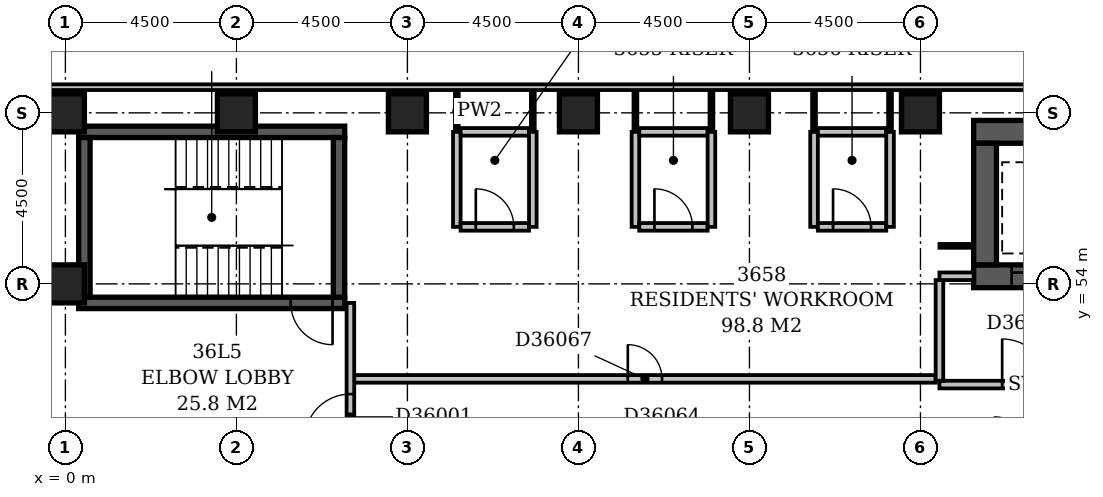
"""IFC4 building model, lengths in metres.
Left out: names, types, materials, properties, quantities, classifications, styles, units other than length and angle.
Written with IfcOpenShell. Run it as: python <this file> out.ifc"""

import sys

from ifc_helpers import new_model, si_unit, direction, frame, frame_2d, origin, origin_2d, place, context, subcontext, project, spatial, rectangle, extrude, element, fill, save


model = new_model("IFC4")
c1 = context("Model", 3, precision=1e-05, world=origin(), true_north=direction((0.0, 1.0)))
c2 = subcontext(c1, "Body", "Model", "MODEL_VIEW")
j1 = project(units=[si_unit("LENGTHUNIT", "METRE"), si_unit("PLANEANGLEUNIT", "RADIAN")], contexts=[c1])
p1 = place(None, origin())
s1 = spatial("IfcSite", under=j1, at=p1, CompositionType="ELEMENT")
p2 = place(p1, origin())
s2 = spatial("IfcBuilding", under=s1, at=p2, CompositionType="ELEMENT")
p3 = place(p2, frame((0.0, 0.0, 144.8)))
s3 = spatial("IfcBuildingStorey", under=s2, at=p3, CompositionType="ELEMENT", Elevation=144.8)
p4 = place(p3, frame((0.35, 53.5, -0.3), z_axis=(0.0, 0.0, 1.0), x_axis=(1.0, 0.0, 0.0)))
e1 = element("IfcWall", 1, at=p4, inside=s3, PredefinedType="SHEAR", context=c2, shape_type="SweptSolid", body=[
    extrude(rectangle(XDim=7.0, YDim=0.3, at=frame_2d((3.5, 0.0))), origin(), (0.0, 0.0, 1.0), 3.6),
])
p5 = place(p4, frame((5.58, 0.0, 0.3)))
e2 = element("IfcOpeningElement", 2, at=p5, cuts=e1, PredefinedType="OPENING", context=c2, shape_type="SweptSolid", body=[
    extrude(rectangle(XDim=1.1, YDim=2.1, at=frame_2d((0.55, 1.05))), frame((0.0, 0.162, 0.0), z_axis=(0.0, -1.0, 0.0), x_axis=(1.0, 0.0, 0.0)), (0.0, 0.0, 1.0), 0.324),
])
p6 = place(p3, frame((0.35, 58.0, -0.3), z_axis=(0.0, 0.0, 1.0), x_axis=(1.0, 0.0, 0.0)))
e3 = element("IfcWall", 3, at=p6, inside=s3, PredefinedType="SHEAR", context=c2, shape_type="SweptSolid", body=[
    extrude(rectangle(XDim=7.0, YDim=0.3, at=frame_2d((3.5, 0.0))), origin(), (0.0, 0.0, 1.0), 3.6),
])
for number, where, z_axis, x_axis in (
    (4, (0.5, 53.65, -0.3), (0.0, 0.0, 1.0), (0.0, 1.0, 0.0)),
    (5, (7.2, 53.65, -0.3), (0.0, 0.0, 1.0), (0.0, 1.0, 0.0)),
):
    element("IfcWall", number, at=place(p3, frame(where, z_axis=z_axis, x_axis=x_axis)), inside=s3, PredefinedType="SHEAR", context=c2, shape_type="SweptSolid", body=[
        extrude(rectangle(XDim=4.2, YDim=0.3, at=frame_2d((2.1, 0.0))), origin(), (0.0, 0.0, 1.0), 3.6),
    ])
p7 = place(p3, frame((23.9, 54.2, -0.3), z_axis=(0.0, 0.0, 1.0), x_axis=(1.0, 0.0, 0.0)))
e6 = element("IfcWall", 6, at=p7, inside=s3, PredefinedType="SHEAR", context=c2, shape_type="SweptSolid", body=[
    extrude(rectangle(XDim=3.1, YDim=0.6, at=frame_2d((1.55, 0.0))), origin(), (0.0, 0.0, 1.0), 3.6),
])
p8 = place(p7, frame((1.0, 0.0, 0.3)))
e7 = element("IfcOpeningElement", 7, at=p8, cuts=e6, PredefinedType="OPENING", context=c2, shape_type="SweptSolid", body=[
    extrude(rectangle(XDim=1.1, YDim=2.1, at=frame_2d((0.55, 1.05))), frame((0.0, 0.312, 0.0), z_axis=(0.0, -1.0, 0.0), x_axis=(1.0, 0.0, 0.0)), (0.0, 0.0, 1.0), 0.624),
])
p9 = place(p3, frame((23.9, 58.0, -0.3), z_axis=(0.0, 0.0, 1.0), x_axis=(1.0, 0.0, 0.0)))
e8 = element("IfcWall", 8, at=p9, inside=s3, PredefinedType="SHEAR", context=c2, shape_type="SweptSolid", body=[
    extrude(rectangle(XDim=3.1, YDim=0.6, at=frame_2d((1.55, 0.0))), origin(), (0.0, 0.0, 1.0), 3.6),
])
p10 = place(p3, frame((24.2, 54.5, -0.3), z_axis=(0.0, 0.0, 1.0), x_axis=(0.0, 1.0, 0.0)))
e9 = element("IfcWall", 9, at=p10, inside=s3, PredefinedType="SHEAR", context=c2, shape_type="SweptSolid", body=[
    extrude(rectangle(XDim=3.2, YDim=0.6, at=frame_2d((1.6, 0.0))), origin(), (0.0, 0.0, 1.0), 3.6),
])
for number, where, z_axis, x_axis in (
    (10, (0.0, 54.0, -0.3), (0.0, 0.0, 1.0), (1.0, 0.0, 0.0)),
    (11, (0.0, 58.5, -0.3), (0.0, 0.0, 1.0), (1.0, 0.0, 0.0)),
    (12, (4.5, 58.5, -0.3), (0.0, 0.0, 1.0), (1.0, 0.0, 0.0)),
    (13, (9.0, 58.5, -0.3), (0.0, 0.0, 1.0), (1.0, 0.0, 0.0)),
    (14, (13.5, 58.5, -0.3), (0.0, 0.0, 1.0), (1.0, 0.0, 0.0)),
    (15, (18.0, 58.5, -0.3), (0.0, 0.0, 1.0), (1.0, 0.0, 0.0)),
    (16, (22.5, 58.5, -0.3), (0.0, 0.0, 1.0), (1.0, 0.0, 0.0)),
):
    element("IfcColumn", number, at=place(p3, frame(where, z_axis=z_axis, x_axis=x_axis)), inside=s3, PredefinedType="COLUMN", context=c2, shape_type="SweptSolid", body=[
        extrude(rectangle(XDim=1.0, YDim=1.0, at=origin_2d()), origin(), (0.0, 0.0, 1.0), 3.6),
    ])
p11 = place(p3, frame((68.1, 59.175, 0.0), z_axis=(0.0, 0.0, 1.0), x_axis=(-1.0, 0.0, 0.0)))
e17 = element("IfcWall", 17, at=p11, inside=s3, PredefinedType="STANDARD", context=c2, shape_type="SweptSolid", body=[
    extrude(rectangle(XDim=68.85, YDim=0.15, at=frame_2d((34.425, 0.0))), origin(), (0.0, 0.0, 1.0), 2.7),
])
p12 = place(p11, frame((15.15, 0.0, 0.6)))
e18 = element("IfcOpeningElement", 18, at=p12, cuts=e17, PredefinedType="OPENING", context=c2, shape_type="SweptSolid", body=[
    extrude(rectangle(XDim=2.4, YDim=1.8, at=frame_2d((1.2, 0.9))), frame((0.0, 0.087, 0.0), z_axis=(0.0, -1.0, 0.0), x_axis=(1.0, 0.0, 0.0)), (0.0, 0.0, 1.0), 0.174),
])
p13 = place(p11, frame((19.65, 0.0, 0.6)))
e19 = element("IfcOpeningElement", 19, at=p13, cuts=e17, PredefinedType="OPENING", context=c2, shape_type="SweptSolid", body=[
    extrude(rectangle(XDim=2.4, YDim=1.8, at=frame_2d((1.2, 0.9))), frame((0.0, 0.087, 0.0), z_axis=(0.0, -1.0, 0.0), x_axis=(1.0, 0.0, 0.0)), (0.0, 0.0, 1.0), 0.174),
])
p14 = place(p11, frame((37.65, 0.0, 0.6)))
e20 = element("IfcOpeningElement", 20, at=p14, cuts=e17, PredefinedType="OPENING", context=c2, shape_type="SweptSolid", body=[
    extrude(rectangle(XDim=2.4, YDim=1.8, at=frame_2d((1.2, 0.9))), frame((0.0, 0.087, 0.0), z_axis=(0.0, -1.0, 0.0), x_axis=(1.0, 0.0, 0.0)), (0.0, 0.0, 1.0), 0.174),
])
p15 = place(p3, frame((23.0, 51.35, 0.0), z_axis=(0.0, 0.0, 1.0), x_axis=(1.0, 0.0, 0.0)))
e21 = element("IfcWall", 21, at=p15, inside=s3, PredefinedType="PARTITIONING", context=c2, shape_type="SweptSolid", body=[
    extrude(rectangle(XDim=4.8, YDim=0.2, at=frame_2d((2.4, 0.0))), origin(), (0.0, 0.0, 1.0), 3.3),
])
p16 = place(p15, frame((1.65, 0.0, 0.0)))
e22 = element("IfcOpeningElement", 22, at=p16, cuts=e21, PredefinedType="OPENING", context=c2, shape_type="SweptSolid", body=[
    extrude(rectangle(XDim=1.2, YDim=2.1, at=frame_2d((0.6, 1.05))), frame((0.0, 0.112, 0.0), z_axis=(0.0, -1.0, 0.0), x_axis=(1.0, 0.0, 0.0)), (0.0, 0.0, 1.0), 0.224),
])
p17 = place(p3, frame((23.0, 54.2, 0.0), z_axis=(0.0, 0.0, 1.0), x_axis=(1.0, 0.0, 0.0)))
e23 = element("IfcWall", 23, at=p17, inside=s3, PredefinedType="PARTITIONING", context=c2, shape_type="SweptSolid", body=[
    extrude(rectangle(XDim=0.9, YDim=0.2, at=frame_2d((0.45, 0.0))), origin(), (0.0, 0.0, 1.0), 3.3),
])
p18 = place(p3, frame((23.0, 51.45, 0.0), z_axis=(0.0, 0.0, 1.0), x_axis=(0.0, 1.0, 0.0)))
e24 = element("IfcWall", 24, at=p18, inside=s3, PredefinedType="PARTITIONING", context=c2, shape_type="SweptSolid", body=[
    extrude(rectangle(XDim=2.65, YDim=0.2, at=frame_2d((1.325, 0.0))), origin(), (0.0, 0.0, 1.0), 3.3),
])
p19 = place(p3, frame((7.5, 49.6, 0.0), z_axis=(0.0, 0.0, 1.0), x_axis=(0.0, 1.0, 0.0)))
e25 = element("IfcWall", 25, at=p19, inside=s3, PredefinedType="PARTITIONING", context=c2, shape_type="SweptSolid", body=[
    extrude(rectangle(XDim=3.9, YDim=0.2, at=frame_2d((1.95, 0.0))), origin(), (0.0, 0.0, 1.0), 3.3),
])
p20 = place(p19, frame((0.3, 0.0, 0.0)))
e26 = element("IfcOpeningElement", 26, at=p20, cuts=e25, PredefinedType="OPENING", context=c2, shape_type="SweptSolid", body=[
    extrude(rectangle(XDim=1.2, YDim=2.1, at=frame_2d((0.6, 1.05))), frame((0.0, 0.112, 0.0), z_axis=(0.0, -1.0, 0.0), x_axis=(1.0, 0.0, 0.0)), (0.0, 0.0, 1.0), 0.224),
])
p21 = place(p3, frame((7.6, 51.5, 0.0), z_axis=(0.0, 0.0, 1.0), x_axis=(1.0, 0.0, 0.0)))
e27 = element("IfcWall", 27, at=p21, inside=s3, PredefinedType="PARTITIONING", context=c2, shape_type="SweptSolid", body=[
    extrude(rectangle(XDim=15.3, YDim=0.2, at=frame_2d((7.65, 0.0))), origin(), (0.0, 0.0, 1.0), 3.3),
])
p22 = place(p21, frame((7.2, 0.0, 0.0)))
e28 = element("IfcOpeningElement", 28, at=p22, cuts=e27, PredefinedType="OPENING", context=c2, shape_type="SweptSolid", body=[
    extrude(rectangle(XDim=0.9, YDim=2.1, at=frame_2d((0.45, 1.05))), frame((0.0, 0.112, 0.0), z_axis=(0.0, -1.0, 0.0), x_axis=(1.0, 0.0, 0.0)), (0.0, 0.0, 1.0), 0.224),
])
p23 = place(p3, frame((23.0, 55.0, 0.0), z_axis=(0.0, 0.0, 1.0), x_axis=(1.0, 0.0, 0.0)))
e29 = element("IfcWall", 29, at=p23, inside=s3, PredefinedType="PARTITIONING", context=c2, shape_type="SweptSolid", body=[
    extrude(rectangle(XDim=0.9, YDim=0.1, at=frame_2d((0.45, 0.0))), origin(), (0.0, 0.0, 1.0), 3.3),
])
p24 = place(p3, frame((10.3, 55.5, 0.0), z_axis=(0.0, 0.0, 1.0), x_axis=(0.0, 1.0, 0.0)))
e30 = element("IfcWall", 30, at=p24, inside=s3, PredefinedType="PARTITIONING", context=c2, shape_type="SweptSolid", body=[
    extrude(rectangle(XDim=2.5, YDim=0.2, at=frame_2d((1.25, 0.0))), origin(), (0.0, 0.0, 1.0), 3.3),
])
p25 = place(p3, frame((10.4, 55.5, 0.0), z_axis=(0.0, 0.0, 1.0), x_axis=(1.0, 0.0, 0.0)))
e31 = element("IfcWall", 31, at=p25, inside=s3, PredefinedType="PARTITIONING", context=c2, shape_type="SweptSolid", body=[
    extrude(rectangle(XDim=1.8, YDim=0.2, at=frame_2d((0.9, 0.0))), origin(), (0.0, 0.0, 1.0), 3.3),
])
p26 = place(p25, frame((0.4, 0.0, 0.0)))
e32 = element("IfcOpeningElement", 32, at=p26, cuts=e31, PredefinedType="OPENING", context=c2, shape_type="SweptSolid", body=[
    extrude(rectangle(XDim=1.0, YDim=2.1, at=frame_2d((0.5, 1.05))), frame((0.0, 0.112, 0.0), z_axis=(0.0, -1.0, 0.0), x_axis=(1.0, 0.0, 0.0)), (0.0, 0.0, 1.0), 0.224),
])
for number, where, z_axis, x_axis in (
    (33, (12.3, 55.5, 0.0), (0.0, 0.0, 1.0), (0.0, 1.0, 0.0)),
    (34, (15.0, 55.5, 0.0), (0.0, 0.0, 1.0), (0.0, 1.0, 0.0)),
):
    element("IfcWall", number, at=place(p3, frame(where, z_axis=z_axis, x_axis=x_axis)), inside=s3, PredefinedType="PARTITIONING", context=c2, shape_type="SweptSolid", body=[
        extrude(rectangle(XDim=2.5, YDim=0.2, at=frame_2d((1.25, 0.0))), origin(), (0.0, 0.0, 1.0), 3.3),
    ])
p27 = place(p3, frame((15.1, 55.5, 0.0), z_axis=(0.0, 0.0, 1.0), x_axis=(1.0, 0.0, 0.0)))
e35 = element("IfcWall", 35, at=p27, inside=s3, PredefinedType="PARTITIONING", context=c2, shape_type="SweptSolid", body=[
    extrude(rectangle(XDim=1.8, YDim=0.2, at=frame_2d((0.9, 0.0))), origin(), (0.0, 0.0, 1.0), 3.3),
])
p28 = place(p27, frame((0.4, 0.0, 0.0)))
e36 = element("IfcOpeningElement", 36, at=p28, cuts=e35, PredefinedType="OPENING", context=c2, shape_type="SweptSolid", body=[
    extrude(rectangle(XDim=1.0, YDim=2.1, at=frame_2d((0.5, 1.05))), frame((0.0, 0.112, 0.0), z_axis=(0.0, -1.0, 0.0), x_axis=(1.0, 0.0, 0.0)), (0.0, 0.0, 1.0), 0.224),
])
for number, where, z_axis, x_axis in (
    (37, (17.0, 55.5, 0.0), (0.0, 0.0, 1.0), (0.0, 1.0, 0.0)),
    (38, (19.7, 55.5, 0.0), (0.0, 0.0, 1.0), (0.0, 1.0, 0.0)),
):
    element("IfcWall", number, at=place(p3, frame(where, z_axis=z_axis, x_axis=x_axis)), inside=s3, PredefinedType="PARTITIONING", context=c2, shape_type="SweptSolid", body=[
        extrude(rectangle(XDim=2.5, YDim=0.2, at=frame_2d((1.25, 0.0))), origin(), (0.0, 0.0, 1.0), 3.3),
    ])
p29 = place(p3, frame((19.8, 55.5, 0.0), z_axis=(0.0, 0.0, 1.0), x_axis=(1.0, 0.0, 0.0)))
e39 = element("IfcWall", 39, at=p29, inside=s3, PredefinedType="PARTITIONING", context=c2, shape_type="SweptSolid", body=[
    extrude(rectangle(XDim=1.8, YDim=0.2, at=frame_2d((0.9, 0.0))), origin(), (0.0, 0.0, 1.0), 3.3),
])
p30 = place(p29, frame((0.4, 0.0, 0.0)))
e40 = element("IfcOpeningElement", 40, at=p30, cuts=e39, PredefinedType="OPENING", context=c2, shape_type="SweptSolid", body=[
    extrude(rectangle(XDim=1.0, YDim=2.1, at=frame_2d((0.5, 1.05))), frame((0.0, 0.112, 0.0), z_axis=(0.0, -1.0, 0.0), x_axis=(1.0, 0.0, 0.0)), (0.0, 0.0, 1.0), 0.224),
])
p31 = place(p3, frame((21.7, 55.5, 0.0), z_axis=(0.0, 0.0, 1.0), x_axis=(0.0, 1.0, 0.0)))
e41 = element("IfcWall", 41, at=p31, inside=s3, PredefinedType="PARTITIONING", context=c2, shape_type="SweptSolid", body=[
    extrude(rectangle(XDim=2.5, YDim=0.2, at=frame_2d((1.25, 0.0))), origin(), (0.0, 0.0, 1.0), 3.3),
])
p32 = place(p3, frame((10.3, 58.0, 0.0), z_axis=(0.0, 0.0, 1.0), x_axis=(0.0, 1.0, 0.0)))
e42 = element("IfcWall", 42, at=p32, inside=s3, PredefinedType="PARTITIONING", context=c2, shape_type="SweptSolid", body=[
    extrude(rectangle(XDim=1.1, YDim=0.1, at=frame_2d((0.55, 0.0))), origin(), (0.0, 0.0, 1.0), 3.3),
])
p33 = place(p3, frame((10.4, 58.0, 0.0), z_axis=(0.0, 0.0, 1.0), x_axis=(1.0, 0.0, 0.0)))
e43 = element("IfcWall", 43, at=p33, inside=s3, PredefinedType="PARTITIONING", context=c2, shape_type="SweptSolid", body=[
    extrude(rectangle(XDim=1.8, YDim=0.2, at=frame_2d((0.9, 0.0))), origin(), (0.0, 0.0, 1.0), 3.3),
])
for number, where, z_axis, x_axis in (
    (44, (12.3, 58.0, 0.0), (0.0, 0.0, 1.0), (0.0, 1.0, 0.0)),
    (45, (15.0, 58.0, 0.0), (0.0, 0.0, 1.0), (0.0, 1.0, 0.0)),
):
    element("IfcWall", number, at=place(p3, frame(where, z_axis=z_axis, x_axis=x_axis)), inside=s3, PredefinedType="PARTITIONING", context=c2, shape_type="SweptSolid", body=[
        extrude(rectangle(XDim=1.1, YDim=0.1, at=frame_2d((0.55, 0.0))), origin(), (0.0, 0.0, 1.0), 3.3),
    ])
p34 = place(p3, frame((15.1, 58.0, 0.0), z_axis=(0.0, 0.0, 1.0), x_axis=(1.0, 0.0, 0.0)))
e46 = element("IfcWall", 46, at=p34, inside=s3, PredefinedType="PARTITIONING", context=c2, shape_type="SweptSolid", body=[
    extrude(rectangle(XDim=1.8, YDim=0.2, at=frame_2d((0.9, 0.0))), origin(), (0.0, 0.0, 1.0), 3.3),
])
for number, where, z_axis, x_axis in (
    (47, (17.0, 58.0, 0.0), (0.0, 0.0, 1.0), (0.0, 1.0, 0.0)),
    (48, (19.7, 58.0, 0.0), (0.0, 0.0, 1.0), (0.0, 1.0, 0.0)),
):
    element("IfcWall", number, at=place(p3, frame(where, z_axis=z_axis, x_axis=x_axis)), inside=s3, PredefinedType="PARTITIONING", context=c2, shape_type="SweptSolid", body=[
        extrude(rectangle(XDim=1.1, YDim=0.1, at=frame_2d((0.55, 0.0))), origin(), (0.0, 0.0, 1.0), 3.3),
    ])
p35 = place(p3, frame((19.8, 58.0, 0.0), z_axis=(0.0, 0.0, 1.0), x_axis=(1.0, 0.0, 0.0)))
e49 = element("IfcWall", 49, at=p35, inside=s3, PredefinedType="PARTITIONING", context=c2, shape_type="SweptSolid", body=[
    extrude(rectangle(XDim=1.8, YDim=0.2, at=frame_2d((0.9, 0.0))), origin(), (0.0, 0.0, 1.0), 3.3),
])
p36 = place(p3, frame((21.7, 58.0, 0.0), z_axis=(0.0, 0.0, 1.0), x_axis=(0.0, 1.0, 0.0)))
e50 = element("IfcWall", 50, at=p36, inside=s3, PredefinedType="PARTITIONING", context=c2, shape_type="SweptSolid", body=[
    extrude(rectangle(XDim=1.1, YDim=0.1, at=frame_2d((0.55, 0.0))), origin(), (0.0, 0.0, 1.0), 3.3),
])
p37 = place(p20, origin())
e51 = element("IfcDoor", 51, at=p37, inside=s3, OperationType="SINGLE_SWING_LEFT", PredefinedType="DOOR", context=c2, shape_type="SweptSolid", body=[
    extrude(rectangle(XDim=1.2, YDim=2.1, at=frame_2d((0.6, 1.05))), frame((0.0, 0.025, 0.0), z_axis=(0.0, -1.0, 0.0), x_axis=(1.0, 0.0, 0.0)), (0.0, 0.0, 1.0), 0.05),
])
fill(e26, e51)
p38 = place(p16, origin())
e52 = element("IfcDoor", 52, at=p38, inside=s3, OperationType="SINGLE_SWING_LEFT", PredefinedType="DOOR", context=c2, shape_type="SweptSolid", body=[
    extrude(rectangle(XDim=1.2, YDim=2.1, at=frame_2d((0.6, 1.05))), frame((0.0, 0.025, 0.0), z_axis=(0.0, -1.0, 0.0), x_axis=(1.0, 0.0, 0.0)), (0.0, 0.0, 1.0), 0.05),
])
fill(e22, e52)
p39 = place(p8, origin())
e53 = element("IfcDoor", 53, at=p39, inside=s3, OperationType="SLIDING_TO_LEFT", PredefinedType="DOOR", context=c2, shape_type="SweptSolid", body=[
    extrude(rectangle(XDim=1.1, YDim=2.1, at=frame_2d((0.55, 1.05))), frame((0.0, 0.025, 0.0), z_axis=(0.0, -1.0, 0.0), x_axis=(1.0, 0.0, 0.0)), (0.0, 0.0, 1.0), 0.05),
])
fill(e7, e53)
p40 = place(p5, origin())
e54 = element("IfcDoor", 54, at=p40, inside=s3, OperationType="SINGLE_SWING_RIGHT", PredefinedType="DOOR", context=c2, shape_type="SweptSolid", body=[
    extrude(rectangle(XDim=1.1, YDim=2.1, at=frame_2d((0.55, 1.05))), frame((0.0, 0.025, 0.0), z_axis=(0.0, -1.0, 0.0), x_axis=(1.0, 0.0, 0.0)), (0.0, 0.0, 1.0), 0.05),
])
fill(e2, e54)
p41 = place(p22, origin())
e55 = element("IfcDoor", 55, at=p41, inside=s3, OperationType="SINGLE_SWING_LEFT", PredefinedType="DOOR", context=c2, shape_type="SweptSolid", body=[
    extrude(rectangle(XDim=0.9, YDim=2.1, at=frame_2d((0.45, 1.05))), frame((0.0, 0.025, 0.0), z_axis=(0.0, -1.0, 0.0), x_axis=(1.0, 0.0, 0.0)), (0.0, 0.0, 1.0), 0.05),
])
fill(e28, e55)
p42 = place(p26, origin())
e56 = element("IfcDoor", 56, at=p42, inside=s3, OperationType="SINGLE_SWING_LEFT", PredefinedType="DOOR", context=c2, shape_type="SweptSolid", body=[
    extrude(rectangle(XDim=1.0, YDim=2.1, at=frame_2d((0.5, 1.05))), frame((0.0, 0.025, 0.0), z_axis=(0.0, -1.0, 0.0), x_axis=(1.0, 0.0, 0.0)), (0.0, 0.0, 1.0), 0.05),
])
fill(e32, e56)
p43 = place(p28, origin())
e57 = element("IfcDoor", 57, at=p43, inside=s3, OperationType="SINGLE_SWING_LEFT", PredefinedType="DOOR", context=c2, shape_type="SweptSolid", body=[
    extrude(rectangle(XDim=1.0, YDim=2.1, at=frame_2d((0.5, 1.05))), frame((0.0, 0.025, 0.0), z_axis=(0.0, -1.0, 0.0), x_axis=(1.0, 0.0, 0.0)), (0.0, 0.0, 1.0), 0.05),
])
fill(e36, e57)
p44 = place(p30, origin())
e58 = element("IfcDoor", 58, at=p44, inside=s3, OperationType="SINGLE_SWING_LEFT", PredefinedType="DOOR", context=c2, shape_type="SweptSolid", body=[
    extrude(rectangle(XDim=1.0, YDim=2.1, at=frame_2d((0.5, 1.05))), frame((0.0, 0.025, 0.0), z_axis=(0.0, -1.0, 0.0), x_axis=(1.0, 0.0, 0.0)), (0.0, 0.0, 1.0), 0.05),
])
fill(e40, e58)
save(model, sys.argv[1])
